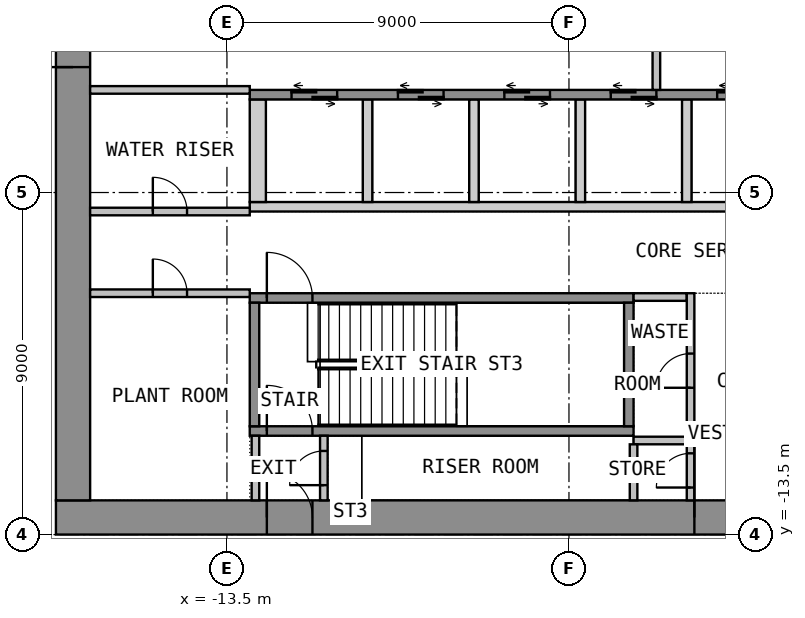
"""IFC4 building model, lengths in metres.
Left out: names, types, materials, properties, quantities, classifications, styles, units other than length and angle.
Written with IfcOpenShell. Run it as: python <this file> out.ifc"""

import sys

from ifc_helpers import new_model, si_unit, direction, frame, frame_2d, origin, place, context, subcontext, project, spatial, polyline, rectangle, outline, extrude, element, fill, save


model = new_model("IFC4")
c1 = context("Model", 3, precision=1e-05, world=origin(), true_north=direction((0.0, 1.0)))
c2 = subcontext(c1, "Body", "Model", "MODEL_VIEW")
j1 = project(units=[si_unit("LENGTHUNIT", "METRE"), si_unit("PLANEANGLEUNIT", "RADIAN")], contexts=[c1])
p1 = place(None, origin())
s1 = spatial("IfcSite", under=j1, at=p1, CompositionType="ELEMENT")
p2 = place(p1, origin())
s2 = spatial("IfcBuilding", under=s1, at=p2, CompositionType="ELEMENT")
p3 = place(p2, frame((0.0, 0.0, 15.6)))
s3 = spatial("IfcBuildingStorey", under=s2, at=p3, CompositionType="ELEMENT", Elevation=15.6)
p4 = place(p3, frame((-18.0, -13.05, 0.0), z_axis=(0.0, 0.0, 1.0), x_axis=(1.0, 0.0, 0.0)))
e1 = element("IfcWall", 1, at=p4, inside=s3, PredefinedType="SHEAR", context=c2, shape_type="SweptSolid", body=[
    extrude(rectangle(XDim=36.0, YDim=0.9, at=frame_2d((18.0, 0.0))), origin(), (0.0, 0.0, 1.0), 4.4),
])
p5 = place(p4, frame((16.8, 0.0, 0.0)))
e2 = element("IfcOpeningElement", 2, at=p5, cuts=e1, PredefinedType="OPENING", context=c2, shape_type="SweptSolid", body=[
    extrude(rectangle(XDim=2.4, YDim=2.1, at=frame_2d((1.2, 1.05))), frame((0.0, 0.46, 0.0), z_axis=(0.0, -1.0, 0.0), x_axis=(1.0, 0.0, 0.0)), (0.0, 0.0, 1.0), 0.92),
])
p6 = place(p4, frame((5.55, 0.0, 0.0)))
e3 = element("IfcOpeningElement", 3, at=p6, cuts=e1, PredefinedType="OPENING", context=c2, shape_type="SweptSolid", body=[
    extrude(rectangle(XDim=1.2, YDim=2.1, at=frame_2d((0.6, 1.05))), frame((0.0, 0.46, 0.0), z_axis=(0.0, -1.0, 0.0), x_axis=(1.0, 0.0, 0.0)), (0.0, 0.0, 1.0), 0.92),
])
p7 = place(p4, frame((29.25, 0.0, 0.0)))
e4 = element("IfcOpeningElement", 4, at=p7, cuts=e1, PredefinedType="OPENING", context=c2, shape_type="SweptSolid", body=[
    extrude(rectangle(XDim=1.2, YDim=2.1, at=frame_2d((0.6, 1.05))), frame((0.0, 0.46, 0.0), z_axis=(0.0, -1.0, 0.0), x_axis=(1.0, 0.0, 0.0)), (0.0, 0.0, 1.0), 0.92),
])
p8 = place(p3, frame((-17.55, -12.6, 0.0), z_axis=(0.0, 0.0, 1.0), x_axis=(0.0, 1.0, 0.0)))
e5 = element("IfcWall", 5, at=p8, inside=s3, PredefinedType="SHEAR", context=c2, shape_type="SweptSolid", body=[
    extrude(rectangle(XDim=25.2, YDim=0.9, at=frame_2d((12.6, 0.0))), origin(), (0.0, 0.0, 1.0), 4.4),
])
p9 = place(p8, frame((11.4, 0.0, 0.0)))
e6 = element("IfcOpeningElement", 6, at=p9, cuts=e5, PredefinedType="OPENING", context=c2, shape_type="SweptSolid", body=[
    extrude(rectangle(XDim=2.4, YDim=2.1, at=frame_2d((1.2, 1.05))), frame((0.0, 0.46, 0.0), z_axis=(0.0, -1.0, 0.0), x_axis=(1.0, 0.0, 0.0)), (0.0, 0.0, 1.0), 0.92),
])
p10 = place(p3, origin())
e7 = element("IfcWall", 7, at=p10, inside=s3, PredefinedType="SHEAR", context=c2, shape_type="SweptSolid", body=[
    extrude(outline(polyline([(-12.9, -5.0), (12.9, -5.0), (12.9, -4.75), (-12.9, -4.75), (-12.9, -5.0)])), origin(), (0.0, 0.0, 1.0), 4.4),
])
p11 = place(p3, origin())
e8 = element("IfcWall", 8, at=p11, inside=s3, PredefinedType="SHEAR", context=c2, shape_type="SweptSolid", body=[
    extrude(outline(polyline([(-12.9, -4.75), (-12.475, -4.75), (-12.475, -2.05), (-12.9, -2.05), (-12.9, -4.75)])), origin(), (0.0, 0.0, 1.0), 4.4),
])
p12 = place(p3, origin())
e9 = element("IfcWall", 9, at=p12, inside=s3, PredefinedType="SHEAR", context=c2, shape_type="SweptSolid", body=[
    extrude(outline(polyline([(-9.925, -4.75), (-9.675, -4.75), (-9.675, -2.05), (-9.925, -2.05), (-9.925, -4.75)])), origin(), (0.0, 0.0, 1.0), 4.4),
])
p13 = place(p3, origin())
e10 = element("IfcWall", 10, at=p13, inside=s3, PredefinedType="SHEAR", context=c2, shape_type="SweptSolid", body=[
    extrude(outline(polyline([(-7.125, -4.75), (-6.875, -4.75), (-6.875, -2.05), (-7.125, -2.05), (-7.125, -4.75)])), origin(), (0.0, 0.0, 1.0), 4.4),
])
p14 = place(p3, origin())
e11 = element("IfcWall", 11, at=p14, inside=s3, PredefinedType="SHEAR", context=c2, shape_type="SweptSolid", body=[
    extrude(outline(polyline([(-4.325, -4.75), (-4.075, -4.75), (-4.075, -2.05), (-4.325, -2.05), (-4.325, -4.75)])), origin(), (0.0, 0.0, 1.0), 4.4),
])
p15 = place(p3, origin())
e12 = element("IfcWall", 12, at=p15, inside=s3, PredefinedType="SHEAR", context=c2, shape_type="SweptSolid", body=[
    extrude(outline(polyline([(-1.525, -4.75), (-1.275, -4.75), (-1.275, -2.05), (-1.525, -2.05), (-1.525, -4.75)])), origin(), (0.0, 0.0, 1.0), 4.4),
])
p16 = place(p3, frame((-12.9, -1.925, 0.0), z_axis=(0.0, 0.0, 1.0), x_axis=(1.0, 0.0, 0.0)))
e13 = element("IfcWall", 13, at=p16, inside=s3, PredefinedType="SHEAR", context=c2, shape_type="SweptSolid", body=[
    extrude(rectangle(XDim=25.8, YDim=0.25, at=frame_2d((12.9, 0.0))), origin(), (0.0, 0.0, 1.0), 4.4),
])
p17 = place(p16, frame((1.1, 0.0, 0.0)))
e14 = element("IfcOpeningElement", 14, at=p17, cuts=e13, PredefinedType="OPENING", context=c2, shape_type="SweptSolid", body=[
    extrude(rectangle(XDim=1.2, YDim=2.1, at=frame_2d((0.6, 1.05))), frame((0.0, 0.135, 0.0), z_axis=(0.0, -1.0, 0.0), x_axis=(1.0, 0.0, 0.0)), (0.0, 0.0, 1.0), 0.27),
])
p18 = place(p16, frame((3.9, 0.0, 0.0)))
e15 = element("IfcOpeningElement", 15, at=p18, cuts=e13, PredefinedType="OPENING", context=c2, shape_type="SweptSolid", body=[
    extrude(rectangle(XDim=1.2, YDim=2.1, at=frame_2d((0.6, 1.05))), frame((0.0, 0.135, 0.0), z_axis=(0.0, -1.0, 0.0), x_axis=(1.0, 0.0, 0.0)), (0.0, 0.0, 1.0), 0.27),
])
p19 = place(p16, frame((6.7, 0.0, 0.0)))
e16 = element("IfcOpeningElement", 16, at=p19, cuts=e13, PredefinedType="OPENING", context=c2, shape_type="SweptSolid", body=[
    extrude(rectangle(XDim=1.2, YDim=2.1, at=frame_2d((0.6, 1.05))), frame((0.0, 0.135, 0.0), z_axis=(0.0, -1.0, 0.0), x_axis=(1.0, 0.0, 0.0)), (0.0, 0.0, 1.0), 0.27),
])
p20 = place(p16, frame((9.5, 0.0, 0.0)))
e17 = element("IfcOpeningElement", 17, at=p20, cuts=e13, PredefinedType="OPENING", context=c2, shape_type="SweptSolid", body=[
    extrude(rectangle(XDim=1.2, YDim=2.1, at=frame_2d((0.6, 1.05))), frame((0.0, 0.135, 0.0), z_axis=(0.0, -1.0, 0.0), x_axis=(1.0, 0.0, 0.0)), (0.0, 0.0, 1.0), 0.27),
])
p21 = place(p16, frame((12.3, 0.0, 0.0)))
e18 = element("IfcOpeningElement", 18, at=p21, cuts=e13, PredefinedType="OPENING", context=c2, shape_type="SweptSolid", body=[
    extrude(rectangle(XDim=1.2, YDim=2.1, at=frame_2d((0.6, 1.05))), frame((0.0, 0.135, 0.0), z_axis=(0.0, -1.0, 0.0), x_axis=(1.0, 0.0, 0.0)), (0.0, 0.0, 1.0), 0.27),
])
p22 = place(p16, frame((15.1, 0.0, 0.0)))
e19 = element("IfcOpeningElement", 19, at=p22, cuts=e13, PredefinedType="OPENING", context=c2, shape_type="SweptSolid", body=[
    extrude(rectangle(XDim=1.2, YDim=2.1, at=frame_2d((0.6, 1.05))), frame((0.0, 0.135, 0.0), z_axis=(0.0, -1.0, 0.0), x_axis=(1.0, 0.0, 0.0)), (0.0, 0.0, 1.0), 0.27),
])
p23 = place(p3, frame((-2.2, -1.8, 0.0), z_axis=(0.0, 0.0, 1.0), x_axis=(0.0, 1.0, 0.0)))
e20 = element("IfcWall", 20, at=p23, inside=s3, PredefinedType="PARTITIONING", context=c2, shape_type="SweptSolid", body=[
    extrude(rectangle(XDim=3.6, YDim=0.2, at=frame_2d((1.8, 0.0))), origin(), (0.0, 0.0, 1.0), 4.4),
])
p24 = place(p23, frame((1.2, 0.0, 0.0)))
e21 = element("IfcOpeningElement", 21, at=p24, cuts=e20, PredefinedType="OPENING", context=c2, shape_type="SweptSolid", body=[
    extrude(rectangle(XDim=1.2, YDim=2.1, at=frame_2d((0.6, 1.05))), frame((0.0, 0.11, 0.0), z_axis=(0.0, -1.0, 0.0), x_axis=(1.0, 0.0, 0.0)), (0.0, 0.0, 1.0), 0.22),
])
p25 = place(p3, frame((-12.9, -10.775, 0.0), z_axis=(0.0, 0.0, 1.0), x_axis=(1.0, 0.0, 0.0)))
e22 = element("IfcWall", 22, at=p25, inside=s3, PredefinedType="SHEAR", context=c2, shape_type="SweptSolid", body=[
    extrude(rectangle(XDim=10.1, YDim=0.25, at=frame_2d((5.05, 0.0))), origin(), (0.0, 0.0, 1.0), 4.4),
])
p26 = place(p25, frame((0.45, 0.0, 0.0)))
e23 = element("IfcOpeningElement", 23, at=p26, cuts=e22, PredefinedType="OPENING", context=c2, shape_type="SweptSolid", body=[
    extrude(rectangle(XDim=1.2, YDim=2.1, at=frame_2d((0.6, 1.05))), frame((0.0, 0.135, 0.0), z_axis=(0.0, -1.0, 0.0), x_axis=(1.0, 0.0, 0.0)), (0.0, 0.0, 1.0), 0.27),
])
p27 = place(p3, frame((-12.9, -7.275, 0.0), z_axis=(0.0, 0.0, 1.0), x_axis=(1.0, 0.0, 0.0)))
e24 = element("IfcWall", 24, at=p27, inside=s3, PredefinedType="SHEAR", context=c2, shape_type="SweptSolid", body=[
    extrude(rectangle(XDim=10.1, YDim=0.25, at=frame_2d((5.05, 0.0))), origin(), (0.0, 0.0, 1.0), 4.4),
])
p28 = place(p27, frame((0.45, 0.0, 0.0)))
e25 = element("IfcOpeningElement", 25, at=p28, cuts=e24, PredefinedType="OPENING", context=c2, shape_type="SweptSolid", body=[
    extrude(rectangle(XDim=1.2, YDim=2.1, at=frame_2d((0.6, 1.05))), frame((0.0, 0.135, 0.0), z_axis=(0.0, -1.0, 0.0), x_axis=(1.0, 0.0, 0.0)), (0.0, 0.0, 1.0), 0.27),
])
for number, where, z_axis, x_axis in (
    (26, (-12.775, -10.65, 0.0), (0.0, 0.0, 1.0), (0.0, 1.0, 0.0)),
    (27, (-2.925, -10.65, 0.0), (0.0, 0.0, 1.0), (0.0, 1.0, 0.0)),
):
    element("IfcWall", number, at=place(p3, frame(where, z_axis=z_axis, x_axis=x_axis)), inside=s3, PredefinedType="SHEAR", context=c2, shape_type="SweptSolid", body=[
        extrude(rectangle(XDim=3.25, YDim=0.25, at=frame_2d((1.625, 0.0))), origin(), (0.0, 0.0, 1.0), 4.4),
    ])
for number, where, z_axis, x_axis in (
    (28, (-2.8, -7.25, 0.0), (0.0, 0.0, 1.0), (1.0, 0.0, 0.0)),
    (29, (-2.8, -11.025, 0.0), (0.0, 0.0, 1.0), (1.0, 0.0, 0.0)),
):
    element("IfcWall", number, at=place(p3, frame(where, z_axis=z_axis, x_axis=x_axis)), inside=s3, PredefinedType="PARTITIONING", context=c2, shape_type="SweptSolid", body=[
        extrude(rectangle(XDim=1.4, YDim=0.2, at=frame_2d((0.7, 0.0))), origin(), (0.0, 0.0, 1.0), 4.4),
    ])
p29 = place(p3, frame((-1.3, -12.6, 0.0), z_axis=(0.0, 0.0, 1.0), x_axis=(0.0, 1.0, 0.0)))
e30 = element("IfcWall", 30, at=p29, inside=s3, PredefinedType="PARTITIONING", context=c2, shape_type="SweptSolid", body=[
    extrude(rectangle(XDim=5.45, YDim=0.2, at=frame_2d((2.725, 0.0))), origin(), (0.0, 0.0, 1.0), 4.4),
])
p30 = place(p29, frame((0.337, 0.0, 0.0)))
e31 = element("IfcOpeningElement", 31, at=p30, cuts=e30, PredefinedType="OPENING", context=c2, shape_type="SweptSolid", body=[
    extrude(rectangle(XDim=0.9, YDim=2.1, at=frame_2d((0.45, 1.05))), frame((0.0, 0.11, 0.0), z_axis=(0.0, -1.0, 0.0), x_axis=(1.0, 0.0, 0.0)), (0.0, 0.0, 1.0), 0.22),
])
p31 = place(p29, frame((2.962, 0.0, 0.0)))
e32 = element("IfcOpeningElement", 32, at=p31, cuts=e30, PredefinedType="OPENING", context=c2, shape_type="SweptSolid", body=[
    extrude(rectangle(XDim=0.9, YDim=2.1, at=frame_2d((0.45, 1.05))), frame((0.0, 0.11, 0.0), z_axis=(0.0, -1.0, 0.0), x_axis=(1.0, 0.0, 0.0)), (0.0, 0.0, 1.0), 0.22),
])
p32 = place(p3, frame((-12.75, -12.6, 0.0), z_axis=(0.0, 0.0, 1.0), x_axis=(0.0, 1.0, 0.0)))
e33 = element("IfcWall", 33, at=p32, inside=s3, PredefinedType="PARTITIONING", context=c2, shape_type="SweptSolid", body=[
    extrude(rectangle(XDim=1.7, YDim=0.2, at=frame_2d((0.85, 0.0))), origin(), (0.0, 0.0, 1.0), 4.4),
])
p33 = place(p3, frame((-10.95, -12.6, 0.0), z_axis=(0.0, 0.0, 1.0), x_axis=(0.0, 1.0, 0.0)))
e34 = element("IfcWall", 34, at=p33, inside=s3, PredefinedType="PARTITIONING", context=c2, shape_type="SweptSolid", body=[
    extrude(rectangle(XDim=1.7, YDim=0.2, at=frame_2d((0.85, 0.0))), origin(), (0.0, 0.0, 1.0), 4.4),
])
p34 = place(p33, frame((0.4, 0.0, 0.0)))
e35 = element("IfcOpeningElement", 35, at=p34, cuts=e34, PredefinedType="OPENING", context=c2, shape_type="SweptSolid", body=[
    extrude(rectangle(XDim=0.9, YDim=2.1, at=frame_2d((0.45, 1.05))), frame((0.0, 0.11, 0.0), z_axis=(0.0, -1.0, 0.0), x_axis=(1.0, 0.0, 0.0)), (0.0, 0.0, 1.0), 0.22),
])
p35 = place(p3, frame((-17.1, -7.15, 0.0), z_axis=(0.0, 0.0, 1.0), x_axis=(1.0, 0.0, 0.0)))
e36 = element("IfcWall", 36, at=p35, inside=s3, PredefinedType="PARTITIONING", context=c2, shape_type="SweptSolid", body=[
    extrude(rectangle(XDim=4.2, YDim=0.2, at=frame_2d((2.1, 0.0))), origin(), (0.0, 0.0, 1.0), 4.4),
])
p36 = place(p35, frame((1.65, 0.0, 0.0)))
e37 = element("IfcOpeningElement", 37, at=p36, cuts=e36, PredefinedType="OPENING", context=c2, shape_type="SweptSolid", body=[
    extrude(rectangle(XDim=0.9, YDim=2.1, at=frame_2d((0.45, 1.05))), frame((0.0, 0.11, 0.0), z_axis=(0.0, -1.0, 0.0), x_axis=(1.0, 0.0, 0.0)), (0.0, 0.0, 1.0), 0.22),
])
p37 = place(p3, frame((-17.1, -5.0, 0.0), z_axis=(0.0, 0.0, 1.0), x_axis=(1.0, 0.0, 0.0)))
e38 = element("IfcWall", 38, at=p37, inside=s3, PredefinedType="PARTITIONING", context=c2, shape_type="SweptSolid", body=[
    extrude(rectangle(XDim=4.2, YDim=0.2, at=frame_2d((2.1, 0.0))), origin(), (0.0, 0.0, 1.0), 4.4),
])
p38 = place(p37, frame((1.65, 0.0, 0.0)))
e39 = element("IfcOpeningElement", 39, at=p38, cuts=e38, PredefinedType="OPENING", context=c2, shape_type="SweptSolid", body=[
    extrude(rectangle(XDim=0.9, YDim=2.1, at=frame_2d((0.45, 1.05))), frame((0.0, 0.11, 0.0), z_axis=(0.0, -1.0, 0.0), x_axis=(1.0, 0.0, 0.0)), (0.0, 0.0, 1.0), 0.22),
])
p39 = place(p3, frame((-17.1, -1.8, 0.0), z_axis=(0.0, 0.0, 1.0), x_axis=(1.0, 0.0, 0.0)))
e40 = element("IfcWall", 40, at=p39, inside=s3, PredefinedType="PARTITIONING", context=c2, shape_type="SweptSolid", body=[
    extrude(rectangle(XDim=4.2, YDim=0.2, at=frame_2d((2.1, 0.0))), origin(), (0.0, 0.0, 1.0), 4.4),
])
p40 = place(p3, frame((-2.8, -12.599, 0.0), z_axis=(0.0, 0.0, 1.0), x_axis=(0.0, 1.0, 0.0)))
e41 = element("IfcWall", 41, at=p40, inside=s3, PredefinedType="PARTITIONING", context=c2, shape_type="SweptSolid", body=[
    extrude(rectangle(XDim=1.473, YDim=0.2, at=frame_2d((0.737, 0.0))), origin(), (0.0, 0.0, 1.0), 4.4),
])
p41 = place(p9, origin())
e42 = element("IfcDoor", 42, at=p41, inside=s3, OperationType="DOUBLE_DOOR_DOUBLE_SWING", PredefinedType="DOOR", context=c2, shape_type="SweptSolid", body=[
    extrude(rectangle(XDim=2.4, YDim=2.1, at=frame_2d((1.2, 1.05))), frame((0.0, 0.025, 0.0), z_axis=(0.0, -1.0, 0.0), x_axis=(1.0, 0.0, 0.0)), (0.0, 0.0, 1.0), 0.05),
])
fill(e6, e42)
p42 = place(p5, origin())
e43 = element("IfcDoor", 43, at=p42, inside=s3, OperationType="DOUBLE_DOOR_DOUBLE_SWING", PredefinedType="DOOR", context=c2, shape_type="SweptSolid", body=[
    extrude(rectangle(XDim=2.4, YDim=2.1, at=frame_2d((1.2, 1.05))), frame((0.0, 0.025, 0.0), z_axis=(0.0, -1.0, 0.0), x_axis=(1.0, 0.0, 0.0)), (0.0, 0.0, 1.0), 0.05),
])
fill(e2, e43)
p43 = place(p6, origin())
e44 = element("IfcDoor", 44, at=p43, inside=s3, OperationType="SINGLE_SWING_RIGHT", PredefinedType="DOOR", context=c2, shape_type="SweptSolid", body=[
    extrude(rectangle(XDim=1.2, YDim=2.1, at=frame_2d((0.6, 1.05))), frame((0.0, 0.025, 0.0), z_axis=(0.0, -1.0, 0.0), x_axis=(1.0, 0.0, 0.0)), (0.0, 0.0, 1.0), 0.05),
])
fill(e3, e44)
p44 = place(p17, origin())
e45 = element("IfcDoor", 45, at=p44, inside=s3, OperationType="DOUBLE_DOOR_SLIDING", PredefinedType="DOOR", context=c2, shape_type="SweptSolid", body=[
    extrude(rectangle(XDim=1.2, YDim=2.1, at=frame_2d((0.6, 1.05))), frame((0.0, 0.025, 0.0), z_axis=(0.0, -1.0, 0.0), x_axis=(1.0, 0.0, 0.0)), (0.0, 0.0, 1.0), 0.05),
])
fill(e14, e45)
p45 = place(p18, origin())
e46 = element("IfcDoor", 46, at=p45, inside=s3, OperationType="DOUBLE_DOOR_SLIDING", PredefinedType="DOOR", context=c2, shape_type="SweptSolid", body=[
    extrude(rectangle(XDim=1.2, YDim=2.1, at=frame_2d((0.6, 1.05))), frame((0.0, 0.025, 0.0), z_axis=(0.0, -1.0, 0.0), x_axis=(1.0, 0.0, 0.0)), (0.0, 0.0, 1.0), 0.05),
])
fill(e15, e46)
p46 = place(p19, origin())
e47 = element("IfcDoor", 47, at=p46, inside=s3, OperationType="DOUBLE_DOOR_SLIDING", PredefinedType="DOOR", context=c2, shape_type="SweptSolid", body=[
    extrude(rectangle(XDim=1.2, YDim=2.1, at=frame_2d((0.6, 1.05))), frame((0.0, 0.025, 0.0), z_axis=(0.0, -1.0, 0.0), x_axis=(1.0, 0.0, 0.0)), (0.0, 0.0, 1.0), 0.05),
])
fill(e16, e47)
p47 = place(p20, origin())
e48 = element("IfcDoor", 48, at=p47, inside=s3, OperationType="DOUBLE_DOOR_SLIDING", PredefinedType="DOOR", context=c2, shape_type="SweptSolid", body=[
    extrude(rectangle(XDim=1.2, YDim=2.1, at=frame_2d((0.6, 1.05))), frame((0.0, 0.025, 0.0), z_axis=(0.0, -1.0, 0.0), x_axis=(1.0, 0.0, 0.0)), (0.0, 0.0, 1.0), 0.05),
])
fill(e17, e48)
p48 = place(p21, origin())
e49 = element("IfcDoor", 49, at=p48, inside=s3, OperationType="DOUBLE_DOOR_SLIDING", PredefinedType="DOOR", context=c2, shape_type="SweptSolid", body=[
    extrude(rectangle(XDim=1.2, YDim=2.1, at=frame_2d((0.6, 1.05))), frame((0.0, 0.025, 0.0), z_axis=(0.0, -1.0, 0.0), x_axis=(1.0, 0.0, 0.0)), (0.0, 0.0, 1.0), 0.05),
])
fill(e18, e49)
p49 = place(p28, origin())
e50 = element("IfcDoor", 50, at=p49, inside=s3, OperationType="SINGLE_SWING_LEFT", PredefinedType="DOOR", context=c2, shape_type="SweptSolid", body=[
    extrude(rectangle(XDim=1.2, YDim=2.1, at=frame_2d((0.6, 1.05))), frame((0.0, 0.025, 0.0), z_axis=(0.0, -1.0, 0.0), x_axis=(1.0, 0.0, 0.0)), (0.0, 0.0, 1.0), 0.05),
])
fill(e25, e50)
p50 = place(p30, origin())
e51 = element("IfcDoor", 51, at=p50, inside=s3, OperationType="SINGLE_SWING_LEFT", PredefinedType="DOOR", context=c2, shape_type="SweptSolid", body=[
    extrude(rectangle(XDim=0.9, YDim=2.1, at=frame_2d((0.45, 1.05))), frame((0.0, 0.025, 0.0), z_axis=(0.0, -1.0, 0.0), x_axis=(1.0, 0.0, 0.0)), (0.0, 0.0, 1.0), 0.05),
])
fill(e31, e51)
p51 = place(p31, origin())
e52 = element("IfcDoor", 52, at=p51, inside=s3, OperationType="SINGLE_SWING_LEFT", PredefinedType="DOOR", context=c2, shape_type="SweptSolid", body=[
    extrude(rectangle(XDim=0.9, YDim=2.1, at=frame_2d((0.45, 1.05))), frame((0.0, 0.025, 0.0), z_axis=(0.0, -1.0, 0.0), x_axis=(1.0, 0.0, 0.0)), (0.0, 0.0, 1.0), 0.05),
])
fill(e32, e52)
p52 = place(p26, origin())
e53 = element("IfcDoor", 53, at=p52, inside=s3, OperationType="SINGLE_SWING_RIGHT", PredefinedType="DOOR", context=c2, shape_type="SweptSolid", body=[
    extrude(rectangle(XDim=1.2, YDim=2.1, at=frame_2d((0.6, 1.05))), frame((0.0, 0.025, 0.0), z_axis=(0.0, -1.0, 0.0), x_axis=(1.0, 0.0, 0.0)), (0.0, 0.0, 1.0), 0.05),
])
fill(e23, e53)
p53 = place(p34, origin())
e54 = element("IfcDoor", 54, at=p53, inside=s3, OperationType="SINGLE_SWING_LEFT", PredefinedType="DOOR", context=c2, shape_type="SweptSolid", body=[
    extrude(rectangle(XDim=0.9, YDim=2.1, at=frame_2d((0.45, 1.05))), frame((0.0, 0.025, 0.0), z_axis=(0.0, -1.0, 0.0), x_axis=(1.0, 0.0, 0.0)), (0.0, 0.0, 1.0), 0.05),
])
fill(e35, e54)
p54 = place(p36, origin())
e55 = element("IfcDoor", 55, at=p54, inside=s3, OperationType="SINGLE_SWING_LEFT", PredefinedType="DOOR", context=c2, shape_type="SweptSolid", body=[
    extrude(rectangle(XDim=0.9, YDim=2.1, at=frame_2d((0.45, 1.05))), frame((0.0, 0.025, 0.0), z_axis=(0.0, -1.0, 0.0), x_axis=(1.0, 0.0, 0.0)), (0.0, 0.0, 1.0), 0.05),
])
fill(e37, e55)
p55 = place(p38, origin())
e56 = element("IfcDoor", 56, at=p55, inside=s3, OperationType="SINGLE_SWING_LEFT", PredefinedType="DOOR", context=c2, shape_type="SweptSolid", body=[
    extrude(rectangle(XDim=0.9, YDim=2.1, at=frame_2d((0.45, 1.05))), frame((0.0, 0.025, 0.0), z_axis=(0.0, -1.0, 0.0), x_axis=(1.0, 0.0, 0.0)), (0.0, 0.0, 1.0), 0.05),
])
fill(e39, e56)
save(model, sys.argv[1])
